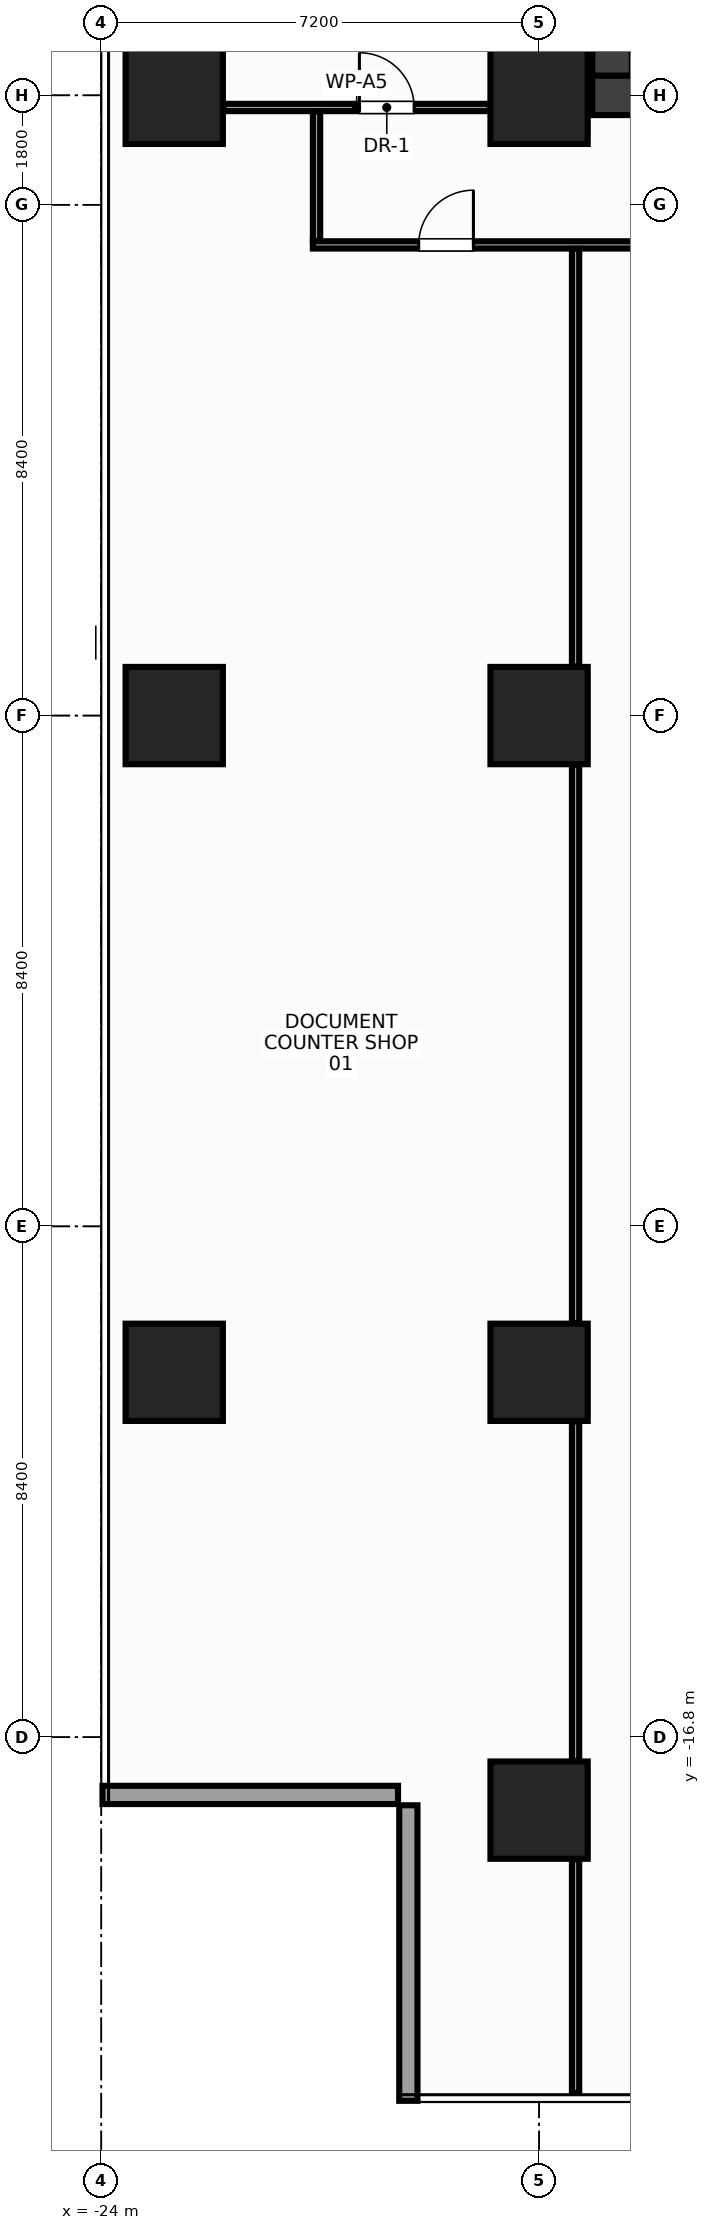
"""IFC4 building model, lengths in metres.
Left out: names, types, materials, properties, quantities, classifications, styles, units other than length and angle.
Written with IfcOpenShell. Run it as: python <this file> out.ifc"""

import sys

from ifc_helpers import new_model, si_unit, direction, frame, frame_2d, origin, origin_2d, place, context, subcontext, project, spatial, rectangle, extrude, source, transform, mapped, element, fill, save


model = new_model("IFC4")
c1 = context("Model", 3, precision=1e-05, world=origin(), true_north=direction((0.0, 1.0)))
c2 = subcontext(c1, "Body", "Model", "MODEL_VIEW")
j1 = project(units=[si_unit("LENGTHUNIT", "METRE"), si_unit("PLANEANGLEUNIT", "RADIAN")], contexts=[c1])
p1 = place(None, origin())
s1 = spatial("IfcSite", under=j1, at=p1, CompositionType="ELEMENT")
p2 = place(p1, origin())
s2 = spatial("IfcBuilding", under=s1, at=p2, CompositionType="ELEMENT")
p3 = place(p2, frame((0.0, 0.0, 135.2)))
s3 = spatial("IfcBuildingStorey", under=s2, at=p3, CompositionType="ELEMENT", Elevation=135.2)
m1 = source(origin(), c2, "Body", "SweptSolid", [
    extrude(rectangle(XDim=31.85, YDim=0.65, at=frame_2d((15.925, 0.0))), origin(), (0.0, 0.0, 1.0), 3.6),
])
p4 = place(p3, frame((-15.925, 10.2, 0.0), z_axis=(0.0, 0.0, 1.0), x_axis=(1.0, 0.0, 0.0)))
e1 = element("IfcWall", 1, at=p4, inside=s3, PredefinedType="SHEAR", context=c2, shape_type="MappedRepresentation", body=[
    mapped(m1, transform((0.0, 0.0, 0.0), x_axis=(1.0, 0.0, 0.0), y_axis=(0.0, 1.0, 0.0), z_axis=(0.0, 0.0, 1.0), scale=1.0)),
])
p5 = place(p4, frame((1.775, 0.0, 0.0)))
e2 = element("IfcOpeningElement", 2, at=p5, cuts=e1, PredefinedType="OPENING", context=c2, shape_type="SweptSolid", body=[
    extrude(rectangle(XDim=1.6, YDim=2.15, at=frame_2d((0.8, 1.075))), frame((0.0, 0.337, 0.0), z_axis=(0.0, -1.0, 0.0), x_axis=(1.0, 0.0, 0.0)), (0.0, 0.0, 1.0), 0.674),
])
p6 = place(p4, frame((28.475, 0.0, 0.0)))
e3 = element("IfcOpeningElement", 3, at=p6, cuts=e1, PredefinedType="OPENING", context=c2, shape_type="SweptSolid", body=[
    extrude(rectangle(XDim=1.6, YDim=2.15, at=frame_2d((0.8, 1.075))), frame((0.0, 0.337, 0.0), z_axis=(0.0, -1.0, 0.0), x_axis=(1.0, 0.0, 0.0)), (0.0, 0.0, 1.0), 0.674),
])
p7 = place(p4, frame((15.175, 0.0, 0.0)))
e4 = element("IfcOpeningElement", 4, at=p7, cuts=e1, PredefinedType="OPENING", context=c2, shape_type="SweptSolid", body=[
    extrude(rectangle(XDim=1.5, YDim=2.2, at=frame_2d((0.75, 1.1))), frame((0.0, 0.337, 0.0), z_axis=(0.0, -1.0, 0.0), x_axis=(1.0, 0.0, 0.0)), (0.0, 0.0, 1.0), 0.674),
])
m2 = source(origin(), c2, "Body", "SweptSolid", [
    extrude(rectangle(XDim=12.95, YDim=0.65, at=frame_2d((6.475, 0.0))), origin(), (0.0, 0.0, 1.0), 3.6),
])
p8 = place(p3, frame((-15.6, 10.525, 0.0), z_axis=(0.0, 0.0, 1.0), x_axis=(0.0, 1.0, 0.0)))
e5 = element("IfcWall", 5, at=p8, inside=s3, PredefinedType="SHEAR", context=c2, shape_type="MappedRepresentation", body=[
    mapped(m2, transform((0.0, 0.0, 0.0), x_axis=(1.0, 0.0, 0.0), y_axis=(0.0, 1.0, 0.0), z_axis=(0.0, 0.0, 1.0), scale=1.0)),
])
m3 = source(origin(), c2, "Body", "SweptSolid", [
    extrude(rectangle(XDim=1.6, YDim=1.6, at=origin_2d()), origin(), (0.0, 0.0, 1.0), 3.6),
])
for number, where, z_axis, x_axis in (
    (6, (-16.8, -18.0, 0.0), (0.0, 0.0, 1.0), (1.0, 0.0, 0.0)),
    (7, (-16.8, -10.8, 0.0), (0.0, 0.0, 1.0), (1.0, 0.0, 0.0)),
    (8, (-16.8, 0.0, 0.0), (0.0, 0.0, 1.0), (1.0, 0.0, 0.0)),
    (9, (-16.8, 10.2, 0.0), (0.0, 0.0, 1.0), (1.0, 0.0, 0.0)),
    (10, (-22.8, -10.8, 0.0), (0.0, 0.0, 1.0), (1.0, 0.0, 0.0)),
    (11, (-22.8, 0.0, 0.0), (0.0, 0.0, 1.0), (1.0, 0.0, 0.0)),
    (12, (-22.8, 10.2, 0.0), (0.0, 0.0, 1.0), (1.0, 0.0, 0.0)),
):
    element("IfcColumn", number, at=place(p3, frame(where, z_axis=z_axis, x_axis=x_axis)), inside=s3, PredefinedType="COLUMN", context=c2, shape_type="MappedRepresentation", body=[
        mapped(m3, transform((0.0, 0.0, 0.0), x_axis=(1.0, 0.0, 0.0), y_axis=(0.0, 1.0, 0.0), z_axis=(0.0, 0.0, 1.0), scale=1.0)),
    ])
m4 = source(origin(), c2, "Body", "SweptSolid", [
    extrude(rectangle(XDim=4.86, YDim=0.3, at=frame_2d((2.43, 0.0))), origin(), (0.0, 0.0, 1.0), 2.76),
])
p9 = place(p3, frame((-23.98, -17.75, 0.0), z_axis=(0.0, 0.0, 1.0), x_axis=(1.0, 0.0, 0.0)))
e13 = element("IfcWall", 13, at=p9, inside=s3, PredefinedType="STANDARD", context=c2, shape_type="MappedRepresentation", body=[
    mapped(m4, transform((0.0, 0.0, 0.0), x_axis=(1.0, 0.0, 0.0), y_axis=(0.0, 1.0, 0.0), z_axis=(0.0, 0.0, 1.0), scale=1.0)),
])
m5 = source(origin(), c2, "Body", "SweptSolid", [
    extrude(rectangle(XDim=4.86, YDim=0.3, at=frame_2d((2.43, 0.0))), origin(), (0.0, 0.0, 1.0), 2.76),
])
p10 = place(p3, frame((-18.95, -17.92, 0.0), z_axis=(0.0, 0.0, 1.0), x_axis=(0.0, -1.0, 0.0)))
e14 = element("IfcWall", 14, at=p10, inside=s3, PredefinedType="STANDARD", context=c2, shape_type="MappedRepresentation", body=[
    mapped(m5, transform((0.0, 0.0, 0.0), x_axis=(1.0, 0.0, 0.0), y_axis=(0.0, 1.0, 0.0), z_axis=(0.0, 0.0, 1.0), scale=1.0)),
])
m6 = source(origin(), c2, "Body", "SweptSolid", [
    extrude(rectangle(XDim=4.38, YDim=0.12, at=frame_2d((2.19, 0.0))), origin(), (0.0, 0.0, 1.0), 2.915),
])
p11 = place(p3, frame((-21.99, 10.0, 0.0), z_axis=(0.0, 0.0, 1.0), x_axis=(1.0, 0.0, 0.0)))
e15 = element("IfcWall", 15, at=p11, inside=s3, PredefinedType="PARTITIONING", context=c2, shape_type="MappedRepresentation", body=[
    mapped(m6, transform((0.0, 0.0, 0.0), x_axis=(1.0, 0.0, 0.0), y_axis=(0.0, 1.0, 0.0), z_axis=(0.0, 0.0, 1.0), scale=1.0)),
])
p12 = place(p11, frame((2.235, 0.0, 0.0)))
e16 = element("IfcOpeningElement", 16, at=p12, cuts=e15, PredefinedType="OPENING", context=c2, shape_type="SweptSolid", body=[
    extrude(rectangle(XDim=0.9, YDim=2.15, at=frame_2d((0.45, 1.075))), frame((0.0, 0.072, 0.0), z_axis=(0.0, -1.0, 0.0), x_axis=(1.0, 0.0, 0.0)), (0.0, 0.0, 1.0), 0.144),
])
m7 = source(origin(), c2, "Body", "SweptSolid", [
    extrude(rectangle(XDim=31.6, YDim=0.12, at=frame_2d((15.8, 0.0))), origin(), (0.0, 0.0, 1.0), 2.765),
])
p13 = place(p3, frame((-20.52, 7.74, 0.0), z_axis=(0.0, 0.0, 1.0), x_axis=(1.0, 0.0, 0.0)))
e17 = element("IfcWall", 17, at=p13, inside=s3, PredefinedType="PARTITIONING", context=c2, shape_type="MappedRepresentation", body=[
    mapped(m7, transform((0.0, 0.0, 0.0), x_axis=(1.0, 0.0, 0.0), y_axis=(0.0, 1.0, 0.0), z_axis=(0.0, 0.0, 1.0), scale=1.0)),
])
p14 = place(p13, frame((1.74, 0.0, 0.0)))
e18 = element("IfcOpeningElement", 18, at=p14, cuts=e17, PredefinedType="OPENING", context=c2, shape_type="SweptSolid", body=[
    extrude(rectangle(XDim=0.9, YDim=2.15, at=frame_2d((0.45, 1.075))), frame((0.0, 0.072, 0.0), z_axis=(0.0, -1.0, 0.0), x_axis=(1.0, 0.0, 0.0)), (0.0, 0.0, 1.0), 0.144),
])
p15 = place(p13, frame((30.28, 0.0, 0.0)))
e19 = element("IfcOpeningElement", 19, at=p15, cuts=e17, PredefinedType="OPENING", context=c2, shape_type="SweptSolid", body=[
    extrude(rectangle(XDim=0.9, YDim=2.15, at=frame_2d((0.45, 1.075))), frame((0.0, 0.072, 0.0), z_axis=(0.0, -1.0, 0.0), x_axis=(1.0, 0.0, 0.0)), (0.0, 0.0, 1.0), 0.144),
])
p16 = place(p13, frame((10.67, 0.0, 0.0)))
e20 = element("IfcOpeningElement", 20, at=p16, cuts=e17, PredefinedType="OPENING", context=c2, shape_type="SweptSolid", body=[
    extrude(rectangle(XDim=0.9, YDim=2.15, at=frame_2d((0.45, 1.075))), frame((0.0, 0.072, 0.0), z_axis=(0.0, -1.0, 0.0), x_axis=(1.0, 0.0, 0.0)), (0.0, 0.0, 1.0), 0.144),
])
p17 = place(p13, frame((23.47, 0.0, 0.0)))
e21 = element("IfcOpeningElement", 21, at=p17, cuts=e17, PredefinedType="OPENING", context=c2, shape_type="SweptSolid", body=[
    extrude(rectangle(XDim=0.9, YDim=2.15, at=frame_2d((0.45, 1.075))), frame((0.0, 0.072, 0.0), z_axis=(0.0, -1.0, 0.0), x_axis=(1.0, 0.0, 0.0)), (0.0, 0.0, 1.0), 0.144),
])
m8 = source(origin(), c2, "Body", "SweptSolid", [
    extrude(rectangle(XDim=2.13, YDim=0.12, at=frame_2d((1.065, 0.0))), origin(), (0.0, 0.0, 1.0), 3.38),
])
p18 = place(p3, frame((-20.46, 7.805, 0.0), z_axis=(0.0, 0.0, 1.0), x_axis=(0.0, 1.0, 0.0)))
e22 = element("IfcWall", 22, at=p18, inside=s3, PredefinedType="PARTITIONING", context=c2, shape_type="MappedRepresentation", body=[
    mapped(m8, transform((0.0, 0.0, 0.0), x_axis=(1.0, 0.0, 0.0), y_axis=(0.0, 1.0, 0.0), z_axis=(0.0, 0.0, 1.0), scale=1.0)),
])
m9 = source(origin(), c2, "Body", "SweptSolid", [
    extrude(rectangle(XDim=3.84, YDim=0.12, at=frame_2d((1.92, 0.0))), origin(), (0.0, 0.0, 1.0), 3.38),
])
p19 = place(p3, frame((-16.2, -22.65, 0.0), z_axis=(0.0, 0.0, 1.0), x_axis=(0.0, 1.0, 0.0)))
e23 = element("IfcWall", 23, at=p19, inside=s3, PredefinedType="PARTITIONING", context=c2, shape_type="MappedRepresentation", body=[
    mapped(m9, transform((0.0, 0.0, 0.0), x_axis=(1.0, 0.0, 0.0), y_axis=(0.0, 1.0, 0.0), z_axis=(0.0, 0.0, 1.0), scale=1.0)),
])
m10 = source(origin(), c2, "Body", "SweptSolid", [
    extrude(rectangle(XDim=5.58, YDim=0.12, at=frame_2d((2.79, 0.0))), origin(), (0.0, 0.0, 1.0), 3.38),
])
p20 = place(p3, frame((-16.2, -17.19, 0.0), z_axis=(0.0, 0.0, 1.0), x_axis=(0.0, 1.0, 0.0)))
e24 = element("IfcWall", 24, at=p20, inside=s3, PredefinedType="PARTITIONING", context=c2, shape_type="MappedRepresentation", body=[
    mapped(m10, transform((0.0, 0.0, 0.0), x_axis=(1.0, 0.0, 0.0), y_axis=(0.0, 1.0, 0.0), z_axis=(0.0, 0.0, 1.0), scale=1.0)),
])
m11 = source(origin(), c2, "Body", "SweptSolid", [
    extrude(rectangle(XDim=9.18, YDim=0.12, at=frame_2d((4.59, 0.0))), origin(), (0.0, 0.0, 1.0), 3.38),
])
p21 = place(p3, frame((-16.2, -9.99, 0.0), z_axis=(0.0, 0.0, 1.0), x_axis=(0.0, 1.0, 0.0)))
e25 = element("IfcWall", 25, at=p21, inside=s3, PredefinedType="PARTITIONING", context=c2, shape_type="MappedRepresentation", body=[
    mapped(m11, transform((0.0, 0.0, 0.0), x_axis=(1.0, 0.0, 0.0), y_axis=(0.0, 1.0, 0.0), z_axis=(0.0, 0.0, 1.0), scale=1.0)),
])
m12 = source(origin(), c2, "Body", "SweptSolid", [
    extrude(rectangle(XDim=6.865, YDim=0.12, at=frame_2d((3.433, 0.0))), origin(), (0.0, 0.0, 1.0), 2.665),
])
p22 = place(p3, frame((-16.2, 0.81, 0.0), z_axis=(0.0, 0.0, 1.0), x_axis=(0.0, 1.0, 0.0)))
e26 = element("IfcWall", 26, at=p22, inside=s3, PredefinedType="PARTITIONING", context=c2, shape_type="MappedRepresentation", body=[
    mapped(m12, transform((0.0, 0.0, 0.0), x_axis=(1.0, 0.0, 0.0), y_axis=(0.0, 1.0, 0.0), z_axis=(0.0, 0.0, 1.0), scale=1.0)),
])
m13 = source(origin(), c2, "Body", "SweptSolid", [
    extrude(rectangle(XDim=0.9, YDim=2.15, at=frame_2d((0.45, 1.075))), frame((0.0, 0.025, 0.0), z_axis=(0.0, -1.0, 0.0), x_axis=(1.0, 0.0, 0.0)), (0.0, 0.0, 1.0), 0.05),
])
p23 = place(p12, origin())
e27 = element("IfcDoor", 27, at=p23, inside=s3, OperationType="SINGLE_SWING_LEFT", PredefinedType="DOOR", context=c2, shape_type="MappedRepresentation", body=[
    mapped(m13, transform((0.0, 0.0, 0.0), x_axis=(1.0, 0.0, 0.0), y_axis=(0.0, 1.0, 0.0), z_axis=(0.0, 0.0, 1.0), scale=1.0)),
])
fill(e16, e27)
p24 = place(p14, origin())
e28 = element("IfcDoor", 28, at=p24, inside=s3, OperationType="SINGLE_SWING_RIGHT", PredefinedType="DOOR", context=c2, shape_type="MappedRepresentation", body=[
    mapped(m13, transform((0.0, 0.0, 0.0), x_axis=(1.0, 0.0, 0.0), y_axis=(0.0, 1.0, 0.0), z_axis=(0.0, 0.0, 1.0), scale=1.0)),
])
fill(e18, e28)
save(model, sys.argv[1])
